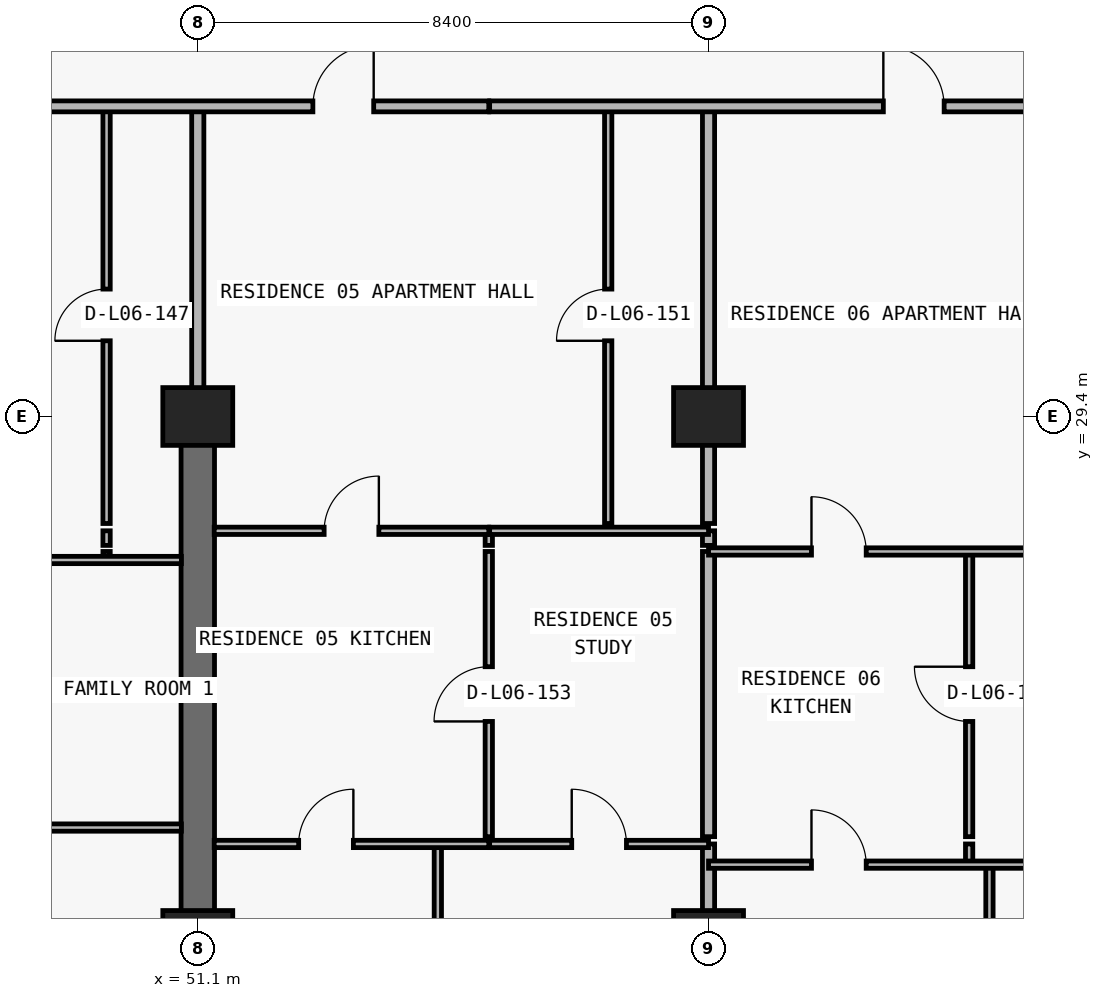
"""IFC4 building model, lengths in metres.
Left out: names, types, materials, properties, quantities, classifications, styles, units other than length and angle.
Written with IfcOpenShell. Run it as: python <this file> out.ifc"""

import sys

from ifc_helpers import new_model, si_unit, direction, frame, frame_2d, origin, origin_2d, place, context, subcontext, project, spatial, rectangle, extrude, element, fill, save


model = new_model("IFC4")
c1 = context("Model", 3, precision=1e-05, world=origin(), true_north=direction((0.0, 1.0)))
c2 = subcontext(c1, "Body", "Model", "MODEL_VIEW")
j1 = project(units=[si_unit("LENGTHUNIT", "METRE"), si_unit("PLANEANGLEUNIT", "RADIAN")], contexts=[c1])
p1 = place(None, origin())
s1 = spatial("IfcSite", under=j1, at=p1, CompositionType="ELEMENT")
p2 = place(p1, origin())
s2 = spatial("IfcBuilding", under=s1, at=p2, CompositionType="ELEMENT")
p3 = place(p2, frame((0.0, 0.0, 30.0)))
s3 = spatial("IfcBuildingStorey", under=s2, at=p3, CompositionType="ELEMENT", Elevation=30.0)
for number, where, z_axis, x_axis in (
    (1, (51.1, 20.8, 0.0), (0.0, 0.0, 1.0), (1.0, 0.0, 0.0)),
    (2, (59.5, 20.8, 0.0), (0.0, 0.0, 1.0), (1.0, 0.0, 0.0)),
    (3, (51.1, 29.4, 0.0), (0.0, 0.0, 1.0), (1.0, 0.0, 0.0)),
    (4, (59.5, 29.4, 0.0), (0.0, 0.0, 1.0), (1.0, 0.0, 0.0)),
):
    element("IfcColumn", number, at=place(p3, frame(where, z_axis=z_axis, x_axis=x_axis)), inside=s3, PredefinedType="COLUMN", context=c2, shape_type="SweptSolid", body=[
        extrude(rectangle(XDim=1.15, YDim=0.95, at=origin_2d()), origin(), (0.0, 0.0, 1.0), 3.05),
    ])
p4 = place(p3, frame((51.1, 20.8, 0.0), z_axis=(0.0, 0.0, 1.0), x_axis=(0.0, 1.0, 0.0)))
e5 = element("IfcWall", 5, at=p4, inside=s3, PredefinedType="SHEAR", context=c2, shape_type="SweptSolid", body=[
    extrude(rectangle(XDim=8.6, YDim=0.55, at=frame_2d((4.3, 0.0))), origin(), (0.0, 0.0, 1.0), 3.05),
])
p5 = place(p3, frame((49.6, 27.04, 0.0), z_axis=(0.0, 0.0, 1.0), x_axis=(0.0, 1.0, 0.0)))
e6 = element("IfcWall", 6, at=p5, inside=s3, PredefinedType="PARTITIONING", context=c2, shape_type="SweptSolid", body=[
    extrude(rectangle(XDim=0.14, YDim=0.12, at=frame_2d((0.07, 0.0))), origin(), (0.0, 0.0, 1.0), 3.05),
])
p6 = place(p3, frame((49.6, 27.28, 0.0), z_axis=(0.0, 0.0, 1.0), x_axis=(0.0, 1.0, 0.0)))
e7 = element("IfcWall", 7, at=p6, inside=s3, PredefinedType="PARTITIONING", context=c2, shape_type="SweptSolid", body=[
    extrude(rectangle(XDim=0.24, YDim=0.12, at=frame_2d((0.12, 0.0))), origin(), (0.0, 0.0, 1.0), 3.05),
])
p7 = place(p3, frame((49.6, 27.64, 0.0), z_axis=(0.0, 0.0, 1.0), x_axis=(0.0, 1.0, 0.0)))
e8 = element("IfcWall", 8, at=p7, inside=s3, PredefinedType="PARTITIONING", context=c2, shape_type="SweptSolid", body=[
    extrude(rectangle(XDim=6.86, YDim=0.12, at=frame_2d((3.43, 0.0))), origin(), (0.0, 0.0, 1.0), 3.05),
])
p8 = place(p7, frame((3.005, 0.0, 0.0)))
e9 = element("IfcOpeningElement", 9, at=p8, cuts=e8, PredefinedType="OPENING", context=c2, shape_type="SweptSolid", body=[
    extrude(rectangle(XDim=0.85, YDim=2.1, at=frame_2d((0.425, 1.05))), frame((0.0, 0.07, 0.0), z_axis=(0.0, -1.0, 0.0), x_axis=(1.0, 0.0, 0.0)), (0.0, 0.0, 1.0), 0.14),
])
p9 = place(p3, frame((51.1, 29.405, 0.0), z_axis=(0.0, 0.0, 1.0), x_axis=(0.0, 1.0, 0.0)))
e10 = element("IfcWall", 10, at=p9, inside=s3, PredefinedType="PARTITIONING", context=c2, shape_type="SweptSolid", body=[
    extrude(rectangle(XDim=5.095, YDim=0.2, at=frame_2d((2.547, 0.0))), origin(), (0.0, 0.0, 1.0), 2.335),
])
p10 = place(p3, frame((55.048, 6.24, 0.0), z_axis=(0.0, 0.0, 1.0), x_axis=(0.0, 1.0, 0.0)))
e11 = element("IfcWall", 11, at=p10, inside=s3, PredefinedType="PARTITIONING", context=c2, shape_type="SweptSolid", body=[
    extrude(rectangle(XDim=16.13, YDim=0.12, at=frame_2d((8.065, 0.0))), origin(), (0.0, 0.0, 1.0), 3.05),
])
p11 = place(p3, frame((55.886, 22.49, 0.0), z_axis=(0.0, 0.0, 1.0), x_axis=(0.0, 1.0, 0.0)))
e12 = element("IfcWall", 12, at=p11, inside=s3, PredefinedType="PARTITIONING", context=c2, shape_type="SweptSolid", body=[
    extrude(rectangle(XDim=4.69, YDim=0.12, at=frame_2d((2.345, 0.0))), origin(), (0.0, 0.0, 1.0), 3.05),
])
p12 = place(p11, frame((1.895, 0.0, 0.0)))
e13 = element("IfcOpeningElement", 13, at=p12, cuts=e12, PredefinedType="OPENING", context=c2, shape_type="SweptSolid", body=[
    extrude(rectangle(XDim=0.9, YDim=2.15, at=frame_2d((0.45, 1.075))), frame((0.0, 0.07, 0.0), z_axis=(0.0, -1.0, 0.0), x_axis=(1.0, 0.0, 0.0)), (0.0, 0.0, 1.0), 0.14),
])
p13 = place(p3, frame((55.886, 27.28, 0.0), z_axis=(0.0, 0.0, 1.0), x_axis=(0.0, 1.0, 0.0)))
e14 = element("IfcWall", 14, at=p13, inside=s3, PredefinedType="PARTITIONING", context=c2, shape_type="SweptSolid", body=[
    extrude(rectangle(XDim=0.24, YDim=0.12, at=frame_2d((0.12, 0.0))), origin(), (0.0, 0.0, 1.0), 3.05),
])
p14 = place(p3, frame((57.85, 27.64, 0.0), z_axis=(0.0, 0.0, 1.0), x_axis=(0.0, 1.0, 0.0)))
e15 = element("IfcWall", 15, at=p14, inside=s3, PredefinedType="PARTITIONING", context=c2, shape_type="SweptSolid", body=[
    extrude(rectangle(XDim=6.86, YDim=0.12, at=frame_2d((3.43, 0.0))), origin(), (0.0, 0.0, 1.0), 3.05),
])
p15 = place(p14, frame((3.005, 0.0, 0.0)))
e16 = element("IfcOpeningElement", 16, at=p15, cuts=e15, PredefinedType="OPENING", context=c2, shape_type="SweptSolid", body=[
    extrude(rectangle(XDim=0.85, YDim=2.1, at=frame_2d((0.425, 1.05))), frame((0.0, 0.07, 0.0), z_axis=(0.0, -1.0, 0.0), x_axis=(1.0, 0.0, 0.0)), (0.0, 0.0, 1.0), 0.14),
])
p16 = place(p3, frame((59.5, 6.24, 0.0), z_axis=(0.0, 0.0, 1.0), x_axis=(0.0, 1.0, 0.0)))
e17 = element("IfcWall", 17, at=p16, inside=s3, PredefinedType="PARTITIONING", context=c2, shape_type="SweptSolid", body=[
    extrude(rectangle(XDim=16.13, YDim=0.2, at=frame_2d((8.065, 0.0))), origin(), (0.0, 0.0, 1.0), 2.11),
])
p17 = place(p3, frame((59.5, 22.49, 0.0), z_axis=(0.0, 0.0, 1.0), x_axis=(0.0, 1.0, 0.0)))
e18 = element("IfcWall", 18, at=p17, inside=s3, PredefinedType="PARTITIONING", context=c2, shape_type="SweptSolid", body=[
    extrude(rectangle(XDim=4.69, YDim=0.2, at=frame_2d((2.345, 0.0))), origin(), (0.0, 0.0, 1.0), 2.11),
])
p18 = place(p3, frame((59.5, 27.28, 0.0), z_axis=(0.0, 0.0, 1.0), x_axis=(0.0, 1.0, 0.0)))
e19 = element("IfcWall", 19, at=p18, inside=s3, PredefinedType="PARTITIONING", context=c2, shape_type="SweptSolid", body=[
    extrude(rectangle(XDim=0.24, YDim=0.2, at=frame_2d((0.12, 0.0))), origin(), (0.0, 0.0, 1.0), 2.11),
])
p19 = place(p3, frame((59.5, 27.64, 0.0), z_axis=(0.0, 0.0, 1.0), x_axis=(0.0, 1.0, 0.0)))
e20 = element("IfcWall", 20, at=p19, inside=s3, PredefinedType="PARTITIONING", context=c2, shape_type="SweptSolid", body=[
    extrude(rectangle(XDim=6.86, YDim=0.2, at=frame_2d((3.43, 0.0))), origin(), (0.0, 0.0, 1.0), 2.11),
])
p20 = place(p3, frame((63.786, 22.03, 0.0), z_axis=(0.0, 0.0, 1.0), x_axis=(0.0, 1.0, 0.0)))
e21 = element("IfcWall", 21, at=p20, inside=s3, PredefinedType="PARTITIONING", context=c2, shape_type="SweptSolid", body=[
    extrude(rectangle(XDim=0.34, YDim=0.12, at=frame_2d((0.17, 0.0))), origin(), (0.0, 0.0, 1.0), 3.05),
])
p21 = place(p3, frame((63.786, 22.49, 0.0), z_axis=(0.0, 0.0, 1.0), x_axis=(0.0, 1.0, 0.0)))
e22 = element("IfcWall", 22, at=p21, inside=s3, PredefinedType="PARTITIONING", context=c2, shape_type="SweptSolid", body=[
    extrude(rectangle(XDim=4.69, YDim=0.12, at=frame_2d((2.345, 0.0))), origin(), (0.0, 0.0, 1.0), 3.05),
])
p22 = place(p21, frame((1.895, 0.0, 0.0)))
e23 = element("IfcOpeningElement", 23, at=p22, cuts=e22, PredefinedType="OPENING", context=c2, shape_type="SweptSolid", body=[
    extrude(rectangle(XDim=0.9, YDim=2.15, at=frame_2d((0.45, 1.075))), frame((0.0, 0.07, 0.0), z_axis=(0.0, -1.0, 0.0), x_axis=(1.0, 0.0, 0.0)), (0.0, 0.0, 1.0), 0.14),
])
p23 = place(p3, frame((64.12, 6.24, 0.0), z_axis=(0.0, 0.0, 1.0), x_axis=(0.0, 1.0, 0.0)))
e24 = element("IfcWall", 24, at=p23, inside=s3, PredefinedType="PARTITIONING", context=c2, shape_type="SweptSolid", body=[
    extrude(rectangle(XDim=15.79, YDim=0.12, at=frame_2d((7.895, 0.0))), origin(), (0.0, 0.0, 1.0), 3.05),
])
p24 = place(p3, frame((59.5, 22.03, 0.0), z_axis=(0.0, 0.0, 1.0), x_axis=(1.0, 0.0, 0.0)))
e25 = element("IfcWall", 25, at=p24, inside=s3, PredefinedType="PARTITIONING", context=c2, shape_type="SweptSolid", body=[
    extrude(rectangle(XDim=8.4, YDim=0.12, at=frame_2d((4.2, 0.0))), origin(), (0.0, 0.0, 1.0), 3.05),
])
p25 = place(p24, frame((1.693, 0.0, 0.0)))
e26 = element("IfcOpeningElement", 26, at=p25, cuts=e25, PredefinedType="OPENING", context=c2, shape_type="SweptSolid", body=[
    extrude(rectangle(XDim=0.9, YDim=2.15, at=frame_2d((0.45, 1.075))), frame((0.0, 0.07, 0.0), z_axis=(0.0, -1.0, 0.0), x_axis=(1.0, 0.0, 0.0)), (0.0, 0.0, 1.0), 0.14),
])
p26 = place(p24, frame((6.06, 0.0, 0.0)))
e27 = element("IfcOpeningElement", 27, at=p26, cuts=e25, PredefinedType="OPENING", context=c2, shape_type="SweptSolid", body=[
    extrude(rectangle(XDim=0.9, YDim=2.15, at=frame_2d((0.45, 1.075))), frame((0.0, 0.07, 0.0), z_axis=(0.0, -1.0, 0.0), x_axis=(1.0, 0.0, 0.0)), (0.0, 0.0, 1.0), 0.14),
])
p27 = place(p3, frame((51.37, 22.37, 0.0), z_axis=(0.0, 0.0, 1.0), x_axis=(1.0, 0.0, 0.0)))
e28 = element("IfcWall", 28, at=p27, inside=s3, PredefinedType="PARTITIONING", context=c2, shape_type="SweptSolid", body=[
    extrude(rectangle(XDim=4.516, YDim=0.12, at=frame_2d((2.258, 0.0))), origin(), (0.0, 0.0, 1.0), 3.05),
])
p28 = place(p27, frame((1.389, 0.0, 0.0)))
e29 = element("IfcOpeningElement", 29, at=p28, cuts=e28, PredefinedType="OPENING", context=c2, shape_type="SweptSolid", body=[
    extrude(rectangle(XDim=0.9, YDim=2.15, at=frame_2d((0.45, 1.075))), frame((0.0, 0.07, 0.0), z_axis=(0.0, -1.0, 0.0), x_axis=(1.0, 0.0, 0.0)), (0.0, 0.0, 1.0), 0.14),
])
p29 = place(p3, frame((55.9, 22.37, 0.0), z_axis=(0.0, 0.0, 1.0), x_axis=(1.0, 0.0, 0.0)))
e30 = element("IfcWall", 30, at=p29, inside=s3, PredefinedType="PARTITIONING", context=c2, shape_type="SweptSolid", body=[
    extrude(rectangle(XDim=3.6, YDim=0.12, at=frame_2d((1.8, 0.0))), origin(), (0.0, 0.0, 1.0), 3.05),
])
p30 = place(p29, frame((1.35, 0.0, 0.0)))
e31 = element("IfcOpeningElement", 31, at=p30, cuts=e30, PredefinedType="OPENING", context=c2, shape_type="SweptSolid", body=[
    extrude(rectangle(XDim=0.9, YDim=2.15, at=frame_2d((0.45, 1.075))), frame((0.0, 0.07, 0.0), z_axis=(0.0, -1.0, 0.0), x_axis=(1.0, 0.0, 0.0)), (0.0, 0.0, 1.0), 0.14),
])
p31 = place(p3, frame((42.705, 22.64, 0.0), z_axis=(0.0, 0.0, 1.0), x_axis=(1.0, 0.0, 0.0)))
e32 = element("IfcWall", 32, at=p31, inside=s3, PredefinedType="PARTITIONING", context=c2, shape_type="SweptSolid", body=[
    extrude(rectangle(XDim=8.125, YDim=0.12, at=frame_2d((4.062, 0.0))), origin(), (0.0, 0.0, 1.0), 3.05),
])
p32 = place(p31, frame((3.613, 0.0, 0.0)))
e33 = element("IfcOpeningElement", 33, at=p32, cuts=e32, PredefinedType="OPENING", context=c2, shape_type="SweptSolid", body=[
    extrude(rectangle(XDim=0.9, YDim=2.15, at=frame_2d((0.45, 1.075))), frame((0.0, 0.07, 0.0), z_axis=(0.0, -1.0, 0.0), x_axis=(1.0, 0.0, 0.0)), (0.0, 0.0, 1.0), 0.14),
])
p33 = place(p3, frame((42.7, 27.04, 0.0), z_axis=(0.0, 0.0, 1.0), x_axis=(1.0, 0.0, 0.0)))
e34 = element("IfcWall", 34, at=p33, inside=s3, PredefinedType="PARTITIONING", context=c2, shape_type="SweptSolid", body=[
    extrude(rectangle(XDim=8.13, YDim=0.12, at=frame_2d((4.065, 0.0))), origin(), (0.0, 0.0, 1.0), 3.05),
])
p34 = place(p33, frame((3.0, 0.0, 0.0)))
e35 = element("IfcOpeningElement", 35, at=p34, cuts=e34, PredefinedType="OPENING", context=c2, shape_type="SweptSolid", body=[
    extrude(rectangle(XDim=0.9, YDim=2.15, at=frame_2d((0.45, 1.075))), frame((0.0, 0.07, 0.0), z_axis=(0.0, -1.0, 0.0), x_axis=(1.0, 0.0, 0.0)), (0.0, 0.0, 1.0), 0.14),
])
p35 = place(p3, frame((59.5, 27.18, 0.0), z_axis=(0.0, 0.0, 1.0), x_axis=(1.0, 0.0, 0.0)))
e36 = element("IfcWall", 36, at=p35, inside=s3, PredefinedType="PARTITIONING", context=c2, shape_type="SweptSolid", body=[
    extrude(rectangle(XDim=8.4, YDim=0.12, at=frame_2d((4.2, 0.0))), origin(), (0.0, 0.0, 1.0), 3.05),
])
p36 = place(p35, frame((1.693, 0.0, 0.0)))
e37 = element("IfcOpeningElement", 37, at=p36, cuts=e36, PredefinedType="OPENING", context=c2, shape_type="SweptSolid", body=[
    extrude(rectangle(XDim=0.9, YDim=2.15, at=frame_2d((0.45, 1.075))), frame((0.0, 0.07, 0.0), z_axis=(0.0, -1.0, 0.0), x_axis=(1.0, 0.0, 0.0)), (0.0, 0.0, 1.0), 0.14),
])
p37 = place(p3, frame((51.37, 27.52, 0.0), z_axis=(0.0, 0.0, 1.0), x_axis=(1.0, 0.0, 0.0)))
e38 = element("IfcWall", 38, at=p37, inside=s3, PredefinedType="PARTITIONING", context=c2, shape_type="SweptSolid", body=[
    extrude(rectangle(XDim=4.516, YDim=0.12, at=frame_2d((2.258, 0.0))), origin(), (0.0, 0.0, 1.0), 3.05),
])
p38 = place(p37, frame((1.808, 0.0, 0.0)))
e39 = element("IfcOpeningElement", 39, at=p38, cuts=e38, PredefinedType="OPENING", context=c2, shape_type="SweptSolid", body=[
    extrude(rectangle(XDim=0.9, YDim=2.15, at=frame_2d((0.45, 1.075))), frame((0.0, 0.07, 0.0), z_axis=(0.0, -1.0, 0.0), x_axis=(1.0, 0.0, 0.0)), (0.0, 0.0, 1.0), 0.14),
])
p39 = place(p3, frame((55.9, 27.52, 0.0), z_axis=(0.0, 0.0, 1.0), x_axis=(1.0, 0.0, 0.0)))
e40 = element("IfcWall", 40, at=p39, inside=s3, PredefinedType="PARTITIONING", context=c2, shape_type="SweptSolid", body=[
    extrude(rectangle(XDim=3.6, YDim=0.12, at=frame_2d((1.8, 0.0))), origin(), (0.0, 0.0, 1.0), 3.05),
])
p40 = place(p3, frame((5.105, 34.5, 0.0), z_axis=(0.0, 0.0, 1.0), x_axis=(1.0, 0.0, 0.0)))
e41 = element("IfcWall", 41, at=p40, inside=s3, PredefinedType="PARTITIONING", context=c2, shape_type="SweptSolid", body=[
    extrude(rectangle(XDim=50.781, YDim=0.18, at=frame_2d((25.391, 0.0))), origin(), (0.0, 0.0, 1.0), 3.05),
])
p41 = place(p40, frame((7.67, 0.0, 0.0)))
e42 = element("IfcOpeningElement", 42, at=p41, cuts=e41, PredefinedType="OPENING", context=c2, shape_type="SweptSolid", body=[
    extrude(rectangle(XDim=1.0, YDim=2.2, at=frame_2d((0.5, 1.1))), frame((0.0, 0.1, 0.0), z_axis=(0.0, -1.0, 0.0), x_axis=(1.0, 0.0, 0.0)), (0.0, 0.0, 1.0), 0.2),
])
p42 = place(p40, frame((16.07, 0.0, 0.0)))
e43 = element("IfcOpeningElement", 43, at=p42, cuts=e41, PredefinedType="OPENING", context=c2, shape_type="SweptSolid", body=[
    extrude(rectangle(XDim=1.0, YDim=2.2, at=frame_2d((0.5, 1.1))), frame((0.0, 0.1, 0.0), z_axis=(0.0, -1.0, 0.0), x_axis=(1.0, 0.0, 0.0)), (0.0, 0.0, 1.0), 0.2),
])
p43 = place(p40, frame((24.47, 0.0, 0.0)))
e44 = element("IfcOpeningElement", 44, at=p43, cuts=e41, PredefinedType="OPENING", context=c2, shape_type="SweptSolid", body=[
    extrude(rectangle(XDim=1.0, YDim=2.2, at=frame_2d((0.5, 1.1))), frame((0.0, 0.1, 0.0), z_axis=(0.0, -1.0, 0.0), x_axis=(1.0, 0.0, 0.0)), (0.0, 0.0, 1.0), 0.2),
])
p44 = place(p40, frame((32.545, 0.0, 0.0)))
e45 = element("IfcOpeningElement", 45, at=p44, cuts=e41, PredefinedType="OPENING", context=c2, shape_type="SweptSolid", body=[
    extrude(rectangle(XDim=1.0, YDim=2.2, at=frame_2d((0.5, 1.1))), frame((0.0, 0.1, 0.0), z_axis=(0.0, -1.0, 0.0), x_axis=(1.0, 0.0, 0.0)), (0.0, 0.0, 1.0), 0.2),
])
p45 = place(p40, frame((47.888, 0.0, 0.0)))
e46 = element("IfcOpeningElement", 46, at=p45, cuts=e41, PredefinedType="OPENING", context=c2, shape_type="SweptSolid", body=[
    extrude(rectangle(XDim=1.0, YDim=2.2, at=frame_2d((0.5, 1.1))), frame((0.0, 0.1, 0.0), z_axis=(0.0, -1.0, 0.0), x_axis=(1.0, 0.0, 0.0)), (0.0, 0.0, 1.0), 0.2),
])
p46 = place(p3, frame((55.9, 34.5, 0.0), z_axis=(0.0, 0.0, 1.0), x_axis=(1.0, 0.0, 0.0)))
e47 = element("IfcWall", 47, at=p46, inside=s3, PredefinedType="PARTITIONING", context=c2, shape_type="SweptSolid", body=[
    extrude(rectangle(XDim=16.8, YDim=0.18, at=frame_2d((8.4, 0.0))), origin(), (0.0, 0.0, 1.0), 3.05),
])
p47 = place(p46, frame((6.475, 0.0, 0.0)))
e48 = element("IfcOpeningElement", 48, at=p47, cuts=e47, PredefinedType="OPENING", context=c2, shape_type="SweptSolid", body=[
    extrude(rectangle(XDim=1.0, YDim=2.2, at=frame_2d((0.5, 1.1))), frame((0.0, 0.1, 0.0), z_axis=(0.0, -1.0, 0.0), x_axis=(1.0, 0.0, 0.0)), (0.0, 0.0, 1.0), 0.2),
])
p48 = place(p8, origin())
e49 = element("IfcDoor", 49, at=p48, inside=s3, OperationType="SINGLE_SWING_LEFT", PredefinedType="DOOR", context=c2, shape_type="SweptSolid", body=[
    extrude(rectangle(XDim=0.85, YDim=2.1, at=frame_2d((0.425, 1.05))), frame((0.0, 0.025, 0.0), z_axis=(0.0, -1.0, 0.0), x_axis=(1.0, 0.0, 0.0)), (0.0, 0.0, 1.0), 0.05),
])
fill(e9, e49)
p49 = place(p45, origin())
e50 = element("IfcDoor", 50, at=p49, inside=s3, OperationType="SINGLE_SWING_RIGHT", PredefinedType="DOOR", context=c2, shape_type="SweptSolid", body=[
    extrude(rectangle(XDim=1.0, YDim=2.2, at=frame_2d((0.5, 1.1))), frame((0.0, 0.025, 0.0), z_axis=(0.0, -1.0, 0.0), x_axis=(1.0, 0.0, 0.0)), (0.0, 0.0, 1.0), 0.05),
])
fill(e46, e50)
p50 = place(p15, origin())
e51 = element("IfcDoor", 51, at=p50, inside=s3, OperationType="SINGLE_SWING_LEFT", PredefinedType="DOOR", context=c2, shape_type="SweptSolid", body=[
    extrude(rectangle(XDim=0.85, YDim=2.1, at=frame_2d((0.425, 1.05))), frame((0.0, 0.025, 0.0), z_axis=(0.0, -1.0, 0.0), x_axis=(1.0, 0.0, 0.0)), (0.0, 0.0, 1.0), 0.05),
])
fill(e16, e51)
p51 = place(p38, origin())
e52 = element("IfcDoor", 52, at=p51, inside=s3, OperationType="SINGLE_SWING_RIGHT", PredefinedType="DOOR", context=c2, shape_type="SweptSolid", body=[
    extrude(rectangle(XDim=0.9, YDim=2.15, at=frame_2d((0.45, 1.075))), frame((0.0, 0.025, 0.0), z_axis=(0.0, -1.0, 0.0), x_axis=(1.0, 0.0, 0.0)), (0.0, 0.0, 1.0), 0.05),
])
fill(e39, e52)
p52 = place(p12, origin())
e53 = element("IfcDoor", 53, at=p52, inside=s3, OperationType="SINGLE_SWING_LEFT", PredefinedType="DOOR", context=c2, shape_type="SweptSolid", body=[
    extrude(rectangle(XDim=0.9, YDim=2.15, at=frame_2d((0.45, 1.075))), frame((0.0, 0.025, 0.0), z_axis=(0.0, -1.0, 0.0), x_axis=(1.0, 0.0, 0.0)), (0.0, 0.0, 1.0), 0.05),
])
fill(e13, e53)
p53 = place(p28, origin())
e54 = element("IfcDoor", 54, at=p53, inside=s3, OperationType="SINGLE_SWING_RIGHT", PredefinedType="DOOR", context=c2, shape_type="SweptSolid", body=[
    extrude(rectangle(XDim=0.9, YDim=2.15, at=frame_2d((0.45, 1.075))), frame((0.0, 0.025, 0.0), z_axis=(0.0, -1.0, 0.0), x_axis=(1.0, 0.0, 0.0)), (0.0, 0.0, 1.0), 0.05),
])
fill(e29, e54)
p54 = place(p30, origin())
e55 = element("IfcDoor", 55, at=p54, inside=s3, OperationType="SINGLE_SWING_LEFT", PredefinedType="DOOR", context=c2, shape_type="SweptSolid", body=[
    extrude(rectangle(XDim=0.9, YDim=2.15, at=frame_2d((0.45, 1.075))), frame((0.0, 0.025, 0.0), z_axis=(0.0, -1.0, 0.0), x_axis=(1.0, 0.0, 0.0)), (0.0, 0.0, 1.0), 0.05),
])
fill(e31, e55)
p55 = place(p47, origin())
e56 = element("IfcDoor", 56, at=p55, inside=s3, OperationType="SINGLE_SWING_LEFT", PredefinedType="DOOR", context=c2, shape_type="SweptSolid", body=[
    extrude(rectangle(XDim=1.0, YDim=2.2, at=frame_2d((0.5, 1.1))), frame((0.0, 0.025, 0.0), z_axis=(0.0, -1.0, 0.0), x_axis=(1.0, 0.0, 0.0)), (0.0, 0.0, 1.0), 0.05),
])
fill(e48, e56)
p56 = place(p36, origin())
e57 = element("IfcDoor", 57, at=p56, inside=s3, OperationType="SINGLE_SWING_LEFT", PredefinedType="DOOR", context=c2, shape_type="SweptSolid", body=[
    extrude(rectangle(XDim=0.9, YDim=2.15, at=frame_2d((0.45, 1.075))), frame((0.0, 0.025, 0.0), z_axis=(0.0, -1.0, 0.0), x_axis=(1.0, 0.0, 0.0)), (0.0, 0.0, 1.0), 0.05),
])
fill(e37, e57)
p57 = place(p22, origin())
e58 = element("IfcDoor", 58, at=p57, inside=s3, OperationType="SINGLE_SWING_RIGHT", PredefinedType="DOOR", context=c2, shape_type="SweptSolid", body=[
    extrude(rectangle(XDim=0.9, YDim=2.15, at=frame_2d((0.45, 1.075))), frame((0.0, 0.025, 0.0), z_axis=(0.0, -1.0, 0.0), x_axis=(1.0, 0.0, 0.0)), (0.0, 0.0, 1.0), 0.05),
])
fill(e23, e58)
p58 = place(p25, origin())
e59 = element("IfcDoor", 59, at=p58, inside=s3, OperationType="SINGLE_SWING_LEFT", PredefinedType="DOOR", context=c2, shape_type="SweptSolid", body=[
    extrude(rectangle(XDim=0.9, YDim=2.15, at=frame_2d((0.45, 1.075))), frame((0.0, 0.025, 0.0), z_axis=(0.0, -1.0, 0.0), x_axis=(1.0, 0.0, 0.0)), (0.0, 0.0, 1.0), 0.05),
])
fill(e26, e59)
save(model, sys.argv[1])
